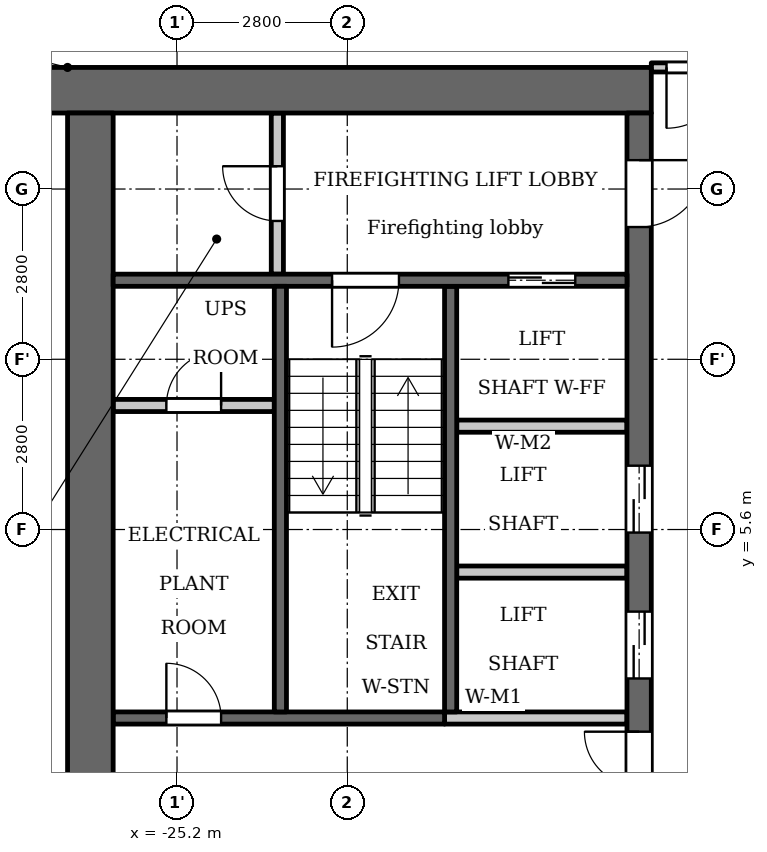
"""IFC4 building model, lengths in metres.
Left out: names, types, materials, properties, quantities, classifications, styles, units other than length and angle.
Written with IfcOpenShell. Run it as: python <this file> out.ifc"""

import sys

from ifc_helpers import new_model, si_unit, direction, frame, frame_2d, origin, place, context, subcontext, project, spatial, rectangle, extrude, element, fill, save


model = new_model("IFC4")
c1 = context("Model", 3, precision=1e-05, world=origin(), true_north=direction((0.0, 1.0)))
c2 = subcontext(c1, "Body", "Model", "MODEL_VIEW")
j1 = project(units=[si_unit("LENGTHUNIT", "METRE"), si_unit("PLANEANGLEUNIT", "RADIAN")], contexts=[c1])
p1 = place(None, origin())
s1 = spatial("IfcSite", under=j1, at=p1, CompositionType="ELEMENT")
p2 = place(p1, origin())
s2 = spatial("IfcBuilding", under=s1, at=p2, CompositionType="ELEMENT")
p3 = place(p2, frame((0.0, 0.0, 139.6)))
s3 = spatial("IfcBuildingStorey", under=s2, at=p3, CompositionType="ELEMENT", Elevation=139.6)
p4 = place(p3, frame((-20.7, 2.6, 0.0), z_axis=(0.0, 0.0, 1.0), x_axis=(0.0, 1.0, 0.0)))
e1 = element("IfcWall", 1, at=p4, inside=s3, PredefinedType="SHEAR", context=c2, shape_type="SweptSolid", body=[
    extrude(rectangle(XDim=7.0, YDim=0.2, at=frame_2d((3.5, 0.0))), origin(), (0.0, 0.0, 1.0), 3.2),
])
p5 = place(p3, frame((-20.8, 2.5, 0.0), z_axis=(0.0, 0.0, 1.0), x_axis=(-1.0, 0.0, 0.0)))
e2 = element("IfcWall", 2, at=p5, inside=s3, PredefinedType="SHEAR", context=c2, shape_type="SweptSolid", body=[
    extrude(rectangle(XDim=5.45, YDim=0.2, at=frame_2d((2.725, 0.0))), origin(), (0.0, 0.0, 1.0), 3.2),
])
p6 = place(p5, frame((3.675, 0.0, 0.0)))
e3 = element("IfcOpeningElement", 3, at=p6, cuts=e2, PredefinedType="OPENING", context=c2, shape_type="SweptSolid", body=[
    extrude(rectangle(XDim=0.9, YDim=2.1, at=frame_2d((0.45, 1.05))), frame((0.0, 0.11, 0.0), z_axis=(0.0, -1.0, 0.0), x_axis=(1.0, 0.0, 0.0)), (0.0, 0.0, 1.0), 0.22),
])
p7 = place(p3, frame((-17.4, 12.825, 0.0), z_axis=(0.0, 0.0, 1.0), x_axis=(-1.0, 0.0, 0.0)))
e4 = element("IfcWall", 4, at=p7, inside=s3, PredefinedType="SHEAR", context=c2, shape_type="SweptSolid", body=[
    extrude(rectangle(XDim=10.4, YDim=0.75, at=frame_2d((5.2, 0.0))), origin(), (0.0, 0.0, 1.0), 3.2),
])
p8 = place(p3, frame((-17.6, -12.45, 0.0), z_axis=(0.0, 0.0, 1.0), x_axis=(0.0, 1.0, 0.0)))
e5 = element("IfcWall", 5, at=p8, inside=s3, PredefinedType="SHEAR", context=c2, shape_type="SweptSolid", body=[
    extrude(rectangle(XDim=24.9, YDim=0.4, at=frame_2d((12.45, 0.0))), origin(), (0.0, 0.0, 1.0), 3.2),
])
p9 = place(p8, frame((8.65, 0.0, 0.0)))
e6 = element("IfcOpeningElement", 6, at=p9, cuts=e5, PredefinedType="OPENING", context=c2, shape_type="SweptSolid", body=[
    extrude(rectangle(XDim=0.9, YDim=2.1, at=frame_2d((0.45, 1.05))), frame((0.0, 0.21, 0.0), z_axis=(0.0, -1.0, 0.0), x_axis=(1.0, 0.0, 0.0)), (0.0, 0.0, 1.0), 0.42),
])
p10 = place(p8, frame((15.6, 0.0, 0.0)))
e7 = element("IfcOpeningElement", 7, at=p10, cuts=e5, PredefinedType="OPENING", context=c2, shape_type="SweptSolid", body=[
    extrude(rectangle(XDim=1.1, YDim=2.1, at=frame_2d((0.55, 1.05))), frame((0.0, 0.21, 0.0), z_axis=(0.0, -1.0, 0.0), x_axis=(1.0, 0.0, 0.0)), (0.0, 0.0, 1.0), 0.42),
])
p11 = place(p8, frame((18.0, 0.0, 0.0)))
e8 = element("IfcOpeningElement", 8, at=p11, cuts=e5, PredefinedType="OPENING", context=c2, shape_type="SweptSolid", body=[
    extrude(rectangle(XDim=1.1, YDim=2.1, at=frame_2d((0.55, 1.05))), frame((0.0, 0.21, 0.0), z_axis=(0.0, -1.0, 0.0), x_axis=(1.0, 0.0, 0.0)), (0.0, 0.0, 1.0), 0.42),
])
p12 = place(p8, frame((23.025, 0.0, 0.0)))
e9 = element("IfcOpeningElement", 9, at=p12, cuts=e5, PredefinedType="OPENING", context=c2, shape_type="SweptSolid", body=[
    extrude(rectangle(XDim=1.1, YDim=2.1, at=frame_2d((0.55, 1.05))), frame((0.0, 0.21, 0.0), z_axis=(0.0, -1.0, 0.0), x_axis=(1.0, 0.0, 0.0)), (0.0, 0.0, 1.0), 0.42),
])
p13 = place(p8, frame((0.775, 0.0, 0.0)))
e10 = element("IfcOpeningElement", 10, at=p13, cuts=e5, PredefinedType="OPENING", context=c2, shape_type="SweptSolid", body=[
    extrude(rectangle(XDim=1.1, YDim=2.1, at=frame_2d((0.55, 1.05))), frame((0.0, 0.21, 0.0), z_axis=(0.0, -1.0, 0.0), x_axis=(1.0, 0.0, 0.0)), (0.0, 0.0, 1.0), 0.42),
])
p14 = place(p8, frame((12.925, 0.0, 0.0)))
e11 = element("IfcOpeningElement", 11, at=p14, cuts=e5, PredefinedType="OPENING", context=c2, shape_type="SweptSolid", body=[
    extrude(rectangle(XDim=1.8, YDim=2.1, at=frame_2d((0.9, 1.05))), frame((0.0, 0.21, 0.0), z_axis=(0.0, -1.0, 0.0), x_axis=(1.0, 0.0, 0.0)), (0.0, 0.0, 1.0), 0.42),
])
p15 = place(p3, frame((-26.625, -12.45, 0.0), z_axis=(0.0, 0.0, 1.0), x_axis=(0.0, 1.0, 0.0)))
e12 = element("IfcWall", 12, at=p15, inside=s3, PredefinedType="SHEAR", context=c2, shape_type="SweptSolid", body=[
    extrude(rectangle(XDim=24.9, YDim=0.75, at=frame_2d((12.45, 0.0))), origin(), (0.0, 0.0, 1.0), 3.2),
])
p16 = place(p3, frame((-23.55, 9.8, 0.0), z_axis=(0.0, 0.0, 1.0), x_axis=(0.0, 1.0, 0.0)))
e13 = element("IfcWall", 13, at=p16, inside=s3, PredefinedType="PARTITIONING", context=c2, shape_type="SweptSolid", body=[
    extrude(rectangle(XDim=2.65, YDim=0.2, at=frame_2d((1.325, 0.0))), origin(), (0.0, 0.0, 1.0), 3.2),
])
p17 = place(p16, frame((0.875, 0.0, 0.0)))
e14 = element("IfcOpeningElement", 14, at=p17, cuts=e13, PredefinedType="OPENING", context=c2, shape_type="SweptSolid", body=[
    extrude(rectangle(XDim=0.9, YDim=2.1, at=frame_2d((0.45, 1.05))), frame((0.0, 0.11, 0.0), z_axis=(0.0, -1.0, 0.0), x_axis=(1.0, 0.0, 0.0)), (0.0, 0.0, 1.0), 0.22),
])
p18 = place(p3, frame((-23.6, 7.64, 0.0), z_axis=(0.0, 0.0, 1.0), x_axis=(-1.0, 0.0, 0.0)))
e15 = element("IfcWall", 15, at=p18, inside=s3, PredefinedType="PARTITIONING", context=c2, shape_type="SweptSolid", body=[
    extrude(rectangle(XDim=2.65, YDim=0.2, at=frame_2d((1.325, 0.0))), origin(), (0.0, 0.0, 1.0), 3.2),
])
p19 = place(p18, frame((0.875, 0.0, 0.0)))
e16 = element("IfcOpeningElement", 16, at=p19, cuts=e15, PredefinedType="OPENING", context=c2, shape_type="SweptSolid", body=[
    extrude(rectangle(XDim=0.9, YDim=2.1, at=frame_2d((0.45, 1.05))), frame((0.0, 0.11, 0.0), z_axis=(0.0, -1.0, 0.0), x_axis=(1.0, 0.0, 0.0)), (0.0, 0.0, 1.0), 0.22),
])
p20 = place(p3, frame((-17.8, 2.5, 0.0), z_axis=(0.0, 0.0, 1.0), x_axis=(-1.0, 0.0, 0.0)))
e17 = element("IfcWall", 17, at=p20, inside=s3, PredefinedType="PARTITIONING", context=c2, shape_type="SweptSolid", body=[
    extrude(rectangle(XDim=3.0, YDim=0.2, at=frame_2d((1.5, 0.0))), origin(), (0.0, 0.0, 1.0), 3.2),
])
for number, where, z_axis, x_axis in (
    (18, (-17.8, 4.9, 0.0), (0.0, 0.0, 1.0), (-1.0, 0.0, 0.0)),
    (19, (-17.8, 7.3, 0.0), (0.0, 0.0, 1.0), (-1.0, 0.0, 0.0)),
):
    element("IfcWall", number, at=place(p3, frame(where, z_axis=z_axis, x_axis=x_axis)), inside=s3, PredefinedType="PARTITIONING", context=c2, shape_type="SweptSolid", body=[
        extrude(rectangle(XDim=2.8, YDim=0.2, at=frame_2d((1.4, 0.0))), origin(), (0.0, 0.0, 1.0), 3.2),
    ])
p21 = place(p3, frame((-17.8, 9.7, 0.0), z_axis=(0.0, 0.0, 1.0), x_axis=(-1.0, 0.0, 0.0)))
e20 = element("IfcWall", 20, at=p21, inside=s3, PredefinedType="SHEAR", context=c2, shape_type="SweptSolid", body=[
    extrude(rectangle(XDim=8.45, YDim=0.2, at=frame_2d((4.225, 0.0))), origin(), (0.0, 0.0, 1.0), 3.2),
])
p22 = place(p21, frame((0.85, 0.0, 0.0)))
e21 = element("IfcOpeningElement", 21, at=p22, cuts=e20, PredefinedType="OPENING", context=c2, shape_type="SweptSolid", body=[
    extrude(rectangle(XDim=1.1, YDim=2.1, at=frame_2d((0.55, 1.05))), frame((0.0, 0.11, 0.0), z_axis=(0.0, -1.0, 0.0), x_axis=(1.0, 0.0, 0.0)), (0.0, 0.0, 1.0), 0.22),
])
p23 = place(p21, frame((3.75, 0.0, 0.0)))
e22 = element("IfcOpeningElement", 22, at=p23, cuts=e20, PredefinedType="OPENING", context=c2, shape_type="SweptSolid", body=[
    extrude(rectangle(XDim=1.1, YDim=2.1, at=frame_2d((0.55, 1.05))), frame((0.0, 0.11, 0.0), z_axis=(0.0, -1.0, 0.0), x_axis=(1.0, 0.0, 0.0)), (0.0, 0.0, 1.0), 0.22),
])
p24 = place(p3, frame((-23.5, 2.6, 0.0), z_axis=(0.0, 0.0, 1.0), x_axis=(0.0, 1.0, 0.0)))
e23 = element("IfcWall", 23, at=p24, inside=s3, PredefinedType="SHEAR", context=c2, shape_type="SweptSolid", body=[
    extrude(rectangle(XDim=7.0, YDim=0.2, at=frame_2d((3.5, 0.0))), origin(), (0.0, 0.0, 1.0), 3.2),
])
p25 = place(p3, frame((-17.4, 13.2, 0.0), z_axis=(0.0, 0.0, 1.0), x_axis=(1.0, 0.0, 0.0)))
e24 = element("IfcWall", 24, at=p25, inside=s3, PredefinedType="PARTITIONING", context=c2, shape_type="SweptSolid", body=[
    extrude(rectangle(XDim=34.8, YDim=0.15, at=frame_2d((17.4, 0.0))), origin(), (0.0, 0.0, 1.0), 3.2),
])
p26 = place(p25, frame((0.25, 0.0, 0.0)))
e25 = element("IfcOpeningElement", 25, at=p26, cuts=e24, PredefinedType="OPENING", context=c2, shape_type="SweptSolid", body=[
    extrude(rectangle(XDim=1.0, YDim=2.1, at=frame_2d((0.5, 1.05))), frame((0.0, 0.085, 0.0), z_axis=(0.0, -1.0, 0.0), x_axis=(1.0, 0.0, 0.0)), (0.0, 0.0, 1.0), 0.17),
])
p27 = place(p25, frame((33.65, 0.0, 0.0)))
e26 = element("IfcOpeningElement", 26, at=p27, cuts=e24, PredefinedType="OPENING", context=c2, shape_type="SweptSolid", body=[
    extrude(rectangle(XDim=1.0, YDim=2.1, at=frame_2d((0.5, 1.05))), frame((0.0, 0.085, 0.0), z_axis=(0.0, -1.0, 0.0), x_axis=(1.0, 0.0, 0.0)), (0.0, 0.0, 1.0), 0.17),
])
p28 = place(p25, frame((15.75, 0.0, 0.0)))
e27 = element("IfcOpeningElement", 27, at=p28, cuts=e24, PredefinedType="OPENING", context=c2, shape_type="SweptSolid", body=[
    extrude(rectangle(XDim=1.0, YDim=2.1, at=frame_2d((0.5, 1.05))), frame((0.0, 0.085, 0.0), z_axis=(0.0, -1.0, 0.0), x_axis=(1.0, 0.0, 0.0)), (0.0, 0.0, 1.0), 0.17),
])
p29 = place(p25, frame((19.35, 0.0, 0.0)))
e28 = element("IfcOpeningElement", 28, at=p29, cuts=e24, PredefinedType="OPENING", context=c2, shape_type="SweptSolid", body=[
    extrude(rectangle(XDim=1.0, YDim=2.1, at=frame_2d((0.5, 1.05))), frame((0.0, 0.085, 0.0), z_axis=(0.0, -1.0, 0.0), x_axis=(1.0, 0.0, 0.0)), (0.0, 0.0, 1.0), 0.17),
])
p30 = place(p25, frame((26.95, 0.0, 0.0)))
e29 = element("IfcOpeningElement", 29, at=p30, cuts=e24, PredefinedType="OPENING", context=c2, shape_type="SweptSolid", body=[
    extrude(rectangle(XDim=1.0, YDim=2.1, at=frame_2d((0.5, 1.05))), frame((0.0, 0.085, 0.0), z_axis=(0.0, -1.0, 0.0), x_axis=(1.0, 0.0, 0.0)), (0.0, 0.0, 1.0), 0.17),
])
p31 = place(p25, frame((29.75, 0.0, 0.0)))
e30 = element("IfcOpeningElement", 30, at=p31, cuts=e24, PredefinedType="OPENING", context=c2, shape_type="SweptSolid", body=[
    extrude(rectangle(XDim=1.0, YDim=2.1, at=frame_2d((0.5, 1.05))), frame((0.0, 0.085, 0.0), z_axis=(0.0, -1.0, 0.0), x_axis=(1.0, 0.0, 0.0)), (0.0, 0.0, 1.0), 0.17),
])
p32 = place(p10, origin())
e31 = element("IfcDoor", 31, at=p32, inside=s3, OperationType="DOUBLE_DOOR_SLIDING", PredefinedType="DOOR", context=c2, shape_type="SweptSolid", body=[
    extrude(rectangle(XDim=1.1, YDim=2.1, at=frame_2d((0.55, 1.05))), frame((0.0, 0.025, 0.0), z_axis=(0.0, -1.0, 0.0), x_axis=(1.0, 0.0, 0.0)), (0.0, 0.0, 1.0), 0.05),
])
fill(e7, e31)
p33 = place(p11, origin())
e32 = element("IfcDoor", 32, at=p33, inside=s3, OperationType="DOUBLE_DOOR_SLIDING", PredefinedType="DOOR", context=c2, shape_type="SweptSolid", body=[
    extrude(rectangle(XDim=1.1, YDim=2.1, at=frame_2d((0.55, 1.05))), frame((0.0, 0.025, 0.0), z_axis=(0.0, -1.0, 0.0), x_axis=(1.0, 0.0, 0.0)), (0.0, 0.0, 1.0), 0.05),
])
fill(e8, e32)
p34 = place(p22, origin())
e33 = element("IfcDoor", 33, at=p34, inside=s3, OperationType="DOUBLE_DOOR_SLIDING", PredefinedType="DOOR", context=c2, shape_type="SweptSolid", body=[
    extrude(rectangle(XDim=1.1, YDim=2.1, at=frame_2d((0.55, 1.05))), frame((0.0, 0.025, 0.0), z_axis=(0.0, -1.0, 0.0), x_axis=(1.0, 0.0, 0.0)), (0.0, 0.0, 1.0), 0.05),
])
fill(e21, e33)
p35 = place(p12, origin())
e34 = element("IfcDoor", 34, at=p35, inside=s3, OperationType="SINGLE_SWING_RIGHT", PredefinedType="DOOR", context=c2, shape_type="SweptSolid", body=[
    extrude(rectangle(XDim=1.1, YDim=2.1, at=frame_2d((0.55, 1.05))), frame((0.0, 0.025, 0.0), z_axis=(0.0, -1.0, 0.0), x_axis=(1.0, 0.0, 0.0)), (0.0, 0.0, 1.0), 0.05),
])
fill(e9, e34)
p36 = place(p17, origin())
e35 = element("IfcDoor", 35, at=p36, inside=s3, OperationType="SINGLE_SWING_LEFT", PredefinedType="DOOR", context=c2, shape_type="SweptSolid", body=[
    extrude(rectangle(XDim=0.9, YDim=2.1, at=frame_2d((0.45, 1.05))), frame((0.0, 0.025, 0.0), z_axis=(0.0, -1.0, 0.0), x_axis=(1.0, 0.0, 0.0)), (0.0, 0.0, 1.0), 0.05),
])
fill(e14, e35)
p37 = place(p23, origin())
e36 = element("IfcDoor", 36, at=p37, inside=s3, OperationType="SINGLE_SWING_LEFT", PredefinedType="DOOR", context=c2, shape_type="SweptSolid", body=[
    extrude(rectangle(XDim=1.1, YDim=2.1, at=frame_2d((0.55, 1.05))), frame((0.0, 0.025, 0.0), z_axis=(0.0, -1.0, 0.0), x_axis=(1.0, 0.0, 0.0)), (0.0, 0.0, 1.0), 0.05),
])
fill(e22, e36)
p38 = place(p14, origin())
e37 = element("IfcDoor", 37, at=p38, inside=s3, OperationType="DOUBLE_DOOR_SINGLE_SWING", PredefinedType="DOOR", context=c2, shape_type="SweptSolid", body=[
    extrude(rectangle(XDim=1.8, YDim=2.1, at=frame_2d((0.9, 1.05))), frame((0.0, 0.025, 0.0), z_axis=(0.0, -1.0, 0.0), x_axis=(1.0, 0.0, 0.0)), (0.0, 0.0, 1.0), 0.05),
])
fill(e11, e37)
p39 = place(p19, origin())
e38 = element("IfcDoor", 38, at=p39, inside=s3, OperationType="SINGLE_SWING_LEFT", PredefinedType="DOOR", context=c2, shape_type="SweptSolid", body=[
    extrude(rectangle(XDim=0.9, YDim=2.1, at=frame_2d((0.45, 1.05))), frame((0.0, 0.025, 0.0), z_axis=(0.0, -1.0, 0.0), x_axis=(1.0, 0.0, 0.0)), (0.0, 0.0, 1.0), 0.05),
])
fill(e16, e38)
p40 = place(p6, origin())
e39 = element("IfcDoor", 39, at=p40, inside=s3, OperationType="SINGLE_SWING_RIGHT", PredefinedType="DOOR", context=c2, shape_type="SweptSolid", body=[
    extrude(rectangle(XDim=0.9, YDim=2.1, at=frame_2d((0.45, 1.05))), frame((0.0, 0.025, 0.0), z_axis=(0.0, -1.0, 0.0), x_axis=(1.0, 0.0, 0.0)), (0.0, 0.0, 1.0), 0.05),
])
fill(e3, e39)
p41 = place(p26, origin())
e40 = element("IfcDoor", 40, at=p41, inside=s3, OperationType="SINGLE_SWING_LEFT", PredefinedType="DOOR", context=c2, shape_type="SweptSolid", body=[
    extrude(rectangle(XDim=1.0, YDim=2.1, at=frame_2d((0.5, 1.05))), frame((0.0, 0.025, 0.0), z_axis=(0.0, -1.0, 0.0), x_axis=(1.0, 0.0, 0.0)), (0.0, 0.0, 1.0), 0.05),
])
fill(e25, e40)
save(model, sys.argv[1])
